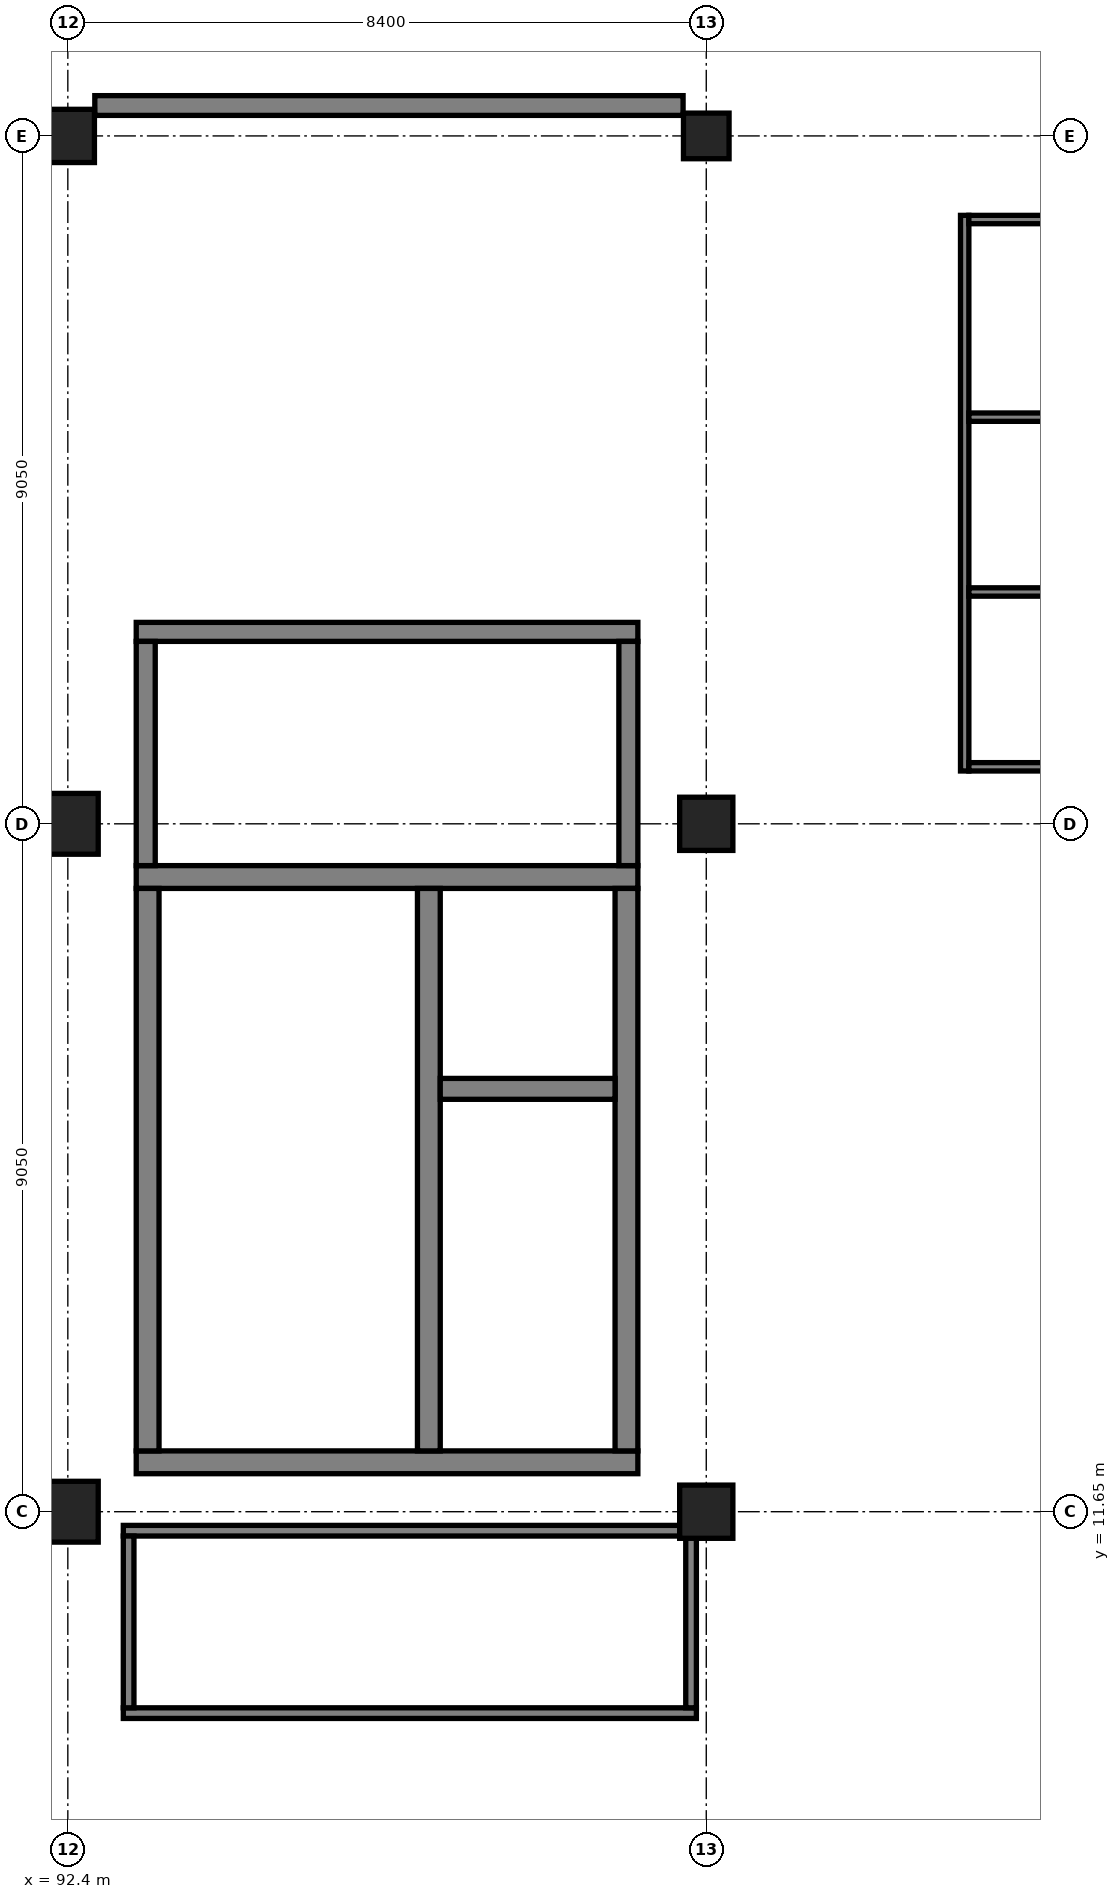
"""IFC4 building model, lengths in metres.
Left out: names, types, materials, properties, quantities, classifications, styles, units other than length and angle.
Written with IfcOpenShell. Run it as: python <this file> out.ifc"""

import sys

from ifc_helpers import new_model, si_unit, direction, frame, frame_2d, origin, origin_2d, place, context, subcontext, project, spatial, rectangle, extrude, element, fill, save


model = new_model("IFC4")
c1 = context("Model", 3, precision=1e-05, world=origin(), true_north=direction((0.0, 1.0)))
c2 = subcontext(c1, "Body", "Model", "MODEL_VIEW")
j1 = project(units=[si_unit("LENGTHUNIT", "METRE"), si_unit("PLANEANGLEUNIT", "RADIAN")], contexts=[c1])
p1 = place(None, origin())
s1 = spatial("IfcSite", under=j1, at=p1, CompositionType="ELEMENT")
p2 = place(p1, origin())
s2 = spatial("IfcBuilding", under=s1, at=p2, CompositionType="ELEMENT")
p3 = place(p2, frame((0.0, 0.0, 10.8)))
s3 = spatial("IfcBuildingStorey", under=s2, at=p3, CompositionType="ELEMENT", Elevation=10.8)
for number, where, z_axis, x_axis in (
    (1, (92.4, 11.65, 0.0), (0.0, 0.0, 1.0), (1.0, 0.0, 0.0)),
    (2, (92.4, 20.7, 0.0), (0.0, 0.0, 1.0), (1.0, 0.0, 0.0)),
):
    element("IfcColumn", number, at=place(p3, frame(where, z_axis=z_axis, x_axis=x_axis)), inside=s3, PredefinedType="COLUMN", context=c2, shape_type="SweptSolid", body=[
        extrude(rectangle(XDim=0.8, YDim=0.8, at=origin_2d()), origin(), (0.0, 0.0, 1.0), 4.8),
    ])
for number, where, z_axis, x_axis in (
    (3, (92.4, 29.75, 0.0), (0.0, 0.0, 1.0), (1.0, 0.0, 0.0)),
    (4, (100.8, 11.65, 0.0), (0.0, 0.0, 1.0), (1.0, 0.0, 0.0)),
    (5, (100.8, 20.7, 0.0), (0.0, 0.0, 1.0), (1.0, 0.0, 0.0)),
):
    element("IfcColumn", number, at=place(p3, frame(where, z_axis=z_axis, x_axis=x_axis)), inside=s3, PredefinedType="COLUMN", context=c2, shape_type="SweptSolid", body=[
        extrude(rectangle(XDim=0.7, YDim=0.7, at=origin_2d()), origin(), (0.0, 0.0, 1.0), 4.8),
    ])
p4 = place(p3, frame((100.8, 29.75, 0.0), z_axis=(0.0, 0.0, 1.0), x_axis=(1.0, 0.0, 0.0)))
e6 = element("IfcColumn", 6, at=p4, inside=s3, PredefinedType="COLUMN", context=c2, shape_type="SweptSolid", body=[
    extrude(rectangle(XDim=0.6, YDim=0.6, at=origin_2d()), origin(), (0.0, 0.0, 1.0), 4.8),
])
p5 = place(p3, frame((100.495, 30.15, 0.0), z_axis=(0.0, 0.0, 1.0), x_axis=(-1.0, 0.0, 0.0)))
e7 = element("IfcWall", 7, at=p5, inside=s3, PredefinedType="STANDARD", context=c2, shape_type="SweptSolid", body=[
    extrude(rectangle(XDim=7.74, YDim=0.26, at=frame_2d((3.87, 0.0))), origin(), (0.0, 0.0, 1.0), 4.5),
])
p6 = place(p5, frame((3.07, 0.0, 0.0)))
e8 = element("IfcOpeningElement", 8, at=p6, cuts=e7, PredefinedType="OPENING", context=c2, shape_type="SweptSolid", body=[
    extrude(rectangle(XDim=1.6, YDim=2.25, at=frame_2d((0.8, 1.125))), frame((0.0, 0.14, 0.0), z_axis=(0.0, -1.0, 0.0), x_axis=(1.0, 0.0, 0.0)), (0.0, 0.0, 1.0), 0.28),
])
p7 = place(p3, frame((93.3, 12.3, 0.0), z_axis=(0.0, 0.0, 1.0), x_axis=(1.0, 0.0, 0.0)))
e9 = element("IfcWall", 9, at=p7, inside=s3, PredefinedType="SHEAR", context=c2, shape_type="SweptSolid", body=[
    extrude(rectangle(XDim=6.6, YDim=0.3, at=frame_2d((3.3, 0.0))), origin(), (0.0, 0.0, 1.0), 4.5),
])
p8 = place(p3, frame((93.3, 20.0, 0.0), z_axis=(0.0, 0.0, 1.0), x_axis=(1.0, 0.0, 0.0)))
e10 = element("IfcWall", 10, at=p8, inside=s3, PredefinedType="SHEAR", context=c2, shape_type="SweptSolid", body=[
    extrude(rectangle(XDim=6.6, YDim=0.3, at=frame_2d((3.3, 0.0))), origin(), (0.0, 0.0, 1.0), 4.5),
])
p9 = place(p8, frame((1.425, 0.0, 0.0)))
e11 = element("IfcOpeningElement", 11, at=p9, cuts=e10, PredefinedType="OPENING", context=c2, shape_type="SweptSolid", body=[
    extrude(rectangle(XDim=1.15, YDim=2.2, at=frame_2d((0.575, 1.1))), frame((0.0, 0.16, 0.0), z_axis=(0.0, -1.0, 0.0), x_axis=(1.0, 0.0, 0.0)), (0.0, 0.0, 1.0), 0.32),
])
p10 = place(p8, frame((4.55, 0.0, 0.0)))
e12 = element("IfcOpeningElement", 12, at=p10, cuts=e10, PredefinedType="OPENING", context=c2, shape_type="SweptSolid", body=[
    extrude(rectangle(XDim=1.2, YDim=2.15, at=frame_2d((0.6, 1.075))), frame((0.0, 0.16, 0.0), z_axis=(0.0, -1.0, 0.0), x_axis=(1.0, 0.0, 0.0)), (0.0, 0.0, 1.0), 0.32),
])
for number, where, z_axis, x_axis in (
    (13, (93.45, 12.45, 0.0), (0.0, 0.0, 1.0), (0.0, 1.0, 0.0)),
    (14, (99.75, 12.45, 0.0), (0.0, 0.0, 1.0), (0.0, 1.0, 0.0)),
    (15, (97.15, 12.45, 0.0), (0.0, 0.0, 1.0), (0.0, 1.0, 0.0)),
):
    element("IfcWall", number, at=place(p3, frame(where, z_axis=z_axis, x_axis=x_axis)), inside=s3, PredefinedType="SHEAR", context=c2, shape_type="SweptSolid", body=[
        extrude(rectangle(XDim=7.4, YDim=0.3, at=frame_2d((3.7, 0.0))), origin(), (0.0, 0.0, 1.0), 4.5),
    ])
p11 = place(p3, frame((97.3, 17.213, 0.0), z_axis=(0.0, 0.0, 1.0), x_axis=(1.0, 0.0, 0.0)))
e16 = element("IfcWall", 16, at=p11, inside=s3, PredefinedType="SHEAR", context=c2, shape_type="SweptSolid", body=[
    extrude(rectangle(XDim=2.3, YDim=0.275, at=frame_2d((1.15, 0.0))), origin(), (0.0, 0.0, 1.0), 4.5),
])
p12 = place(p3, frame((93.3, 23.225, 0.0), z_axis=(0.0, 0.0, 1.0), x_axis=(1.0, 0.0, 0.0)))
e17 = element("IfcWall", 17, at=p12, inside=s3, PredefinedType="PARTITIONING", context=c2, shape_type="SweptSolid", body=[
    extrude(rectangle(XDim=6.6, YDim=0.25, at=frame_2d((3.3, 0.0))), origin(), (0.0, 0.0, 1.0), 4.5),
])
p13 = place(p12, frame((2.4, 0.0, 0.0)))
e18 = element("IfcOpeningElement", 18, at=p13, cuts=e17, PredefinedType="OPENING", context=c2, shape_type="SweptSolid", body=[
    extrude(rectangle(XDim=1.8, YDim=2.25, at=frame_2d((0.9, 1.125))), frame((0.0, 0.135, 0.0), z_axis=(0.0, -1.0, 0.0), x_axis=(1.0, 0.0, 0.0)), (0.0, 0.0, 1.0), 0.27),
])
for number, where, z_axis, x_axis in (
    (19, (93.425, 20.15, 0.0), (0.0, 0.0, 1.0), (0.0, 1.0, 0.0)),
    (20, (99.775, 20.15, 0.0), (0.0, 0.0, 1.0), (0.0, 1.0, 0.0)),
):
    element("IfcWall", number, at=place(p3, frame(where, z_axis=z_axis, x_axis=x_axis)), inside=s3, PredefinedType="PARTITIONING", context=c2, shape_type="SweptSolid", body=[
        extrude(rectangle(XDim=2.95, YDim=0.25, at=frame_2d((1.475, 0.0))), origin(), (0.0, 0.0, 1.0), 3.73),
    ])
p14 = place(p3, frame((104.2, 21.395, 0.0), z_axis=(0.0, 0.0, 1.0), x_axis=(0.0, 1.0, 0.0)))
e21 = element("IfcWall", 21, at=p14, inside=s3, PredefinedType="PARTITIONING", context=c2, shape_type="SweptSolid", body=[
    extrude(rectangle(XDim=7.31, YDim=0.11, at=frame_2d((3.655, 0.0))), origin(), (0.0, 0.0, 1.0), 2.31),
])
p15 = place(p14, frame((0.745, 0.0, 0.0)))
e22 = element("IfcOpeningElement", 22, at=p15, cuts=e21, PredefinedType="OPENING", context=c2, shape_type="SweptSolid", body=[
    extrude(rectangle(XDim=0.92, YDim=2.1, at=frame_2d((0.46, 1.05))), frame((0.0, 0.065, 0.0), z_axis=(0.0, -1.0, 0.0), x_axis=(1.0, 0.0, 0.0)), (0.0, 0.0, 1.0), 0.13),
])
p16 = place(p14, frame((3.045, 0.0, 0.0)))
e23 = element("IfcOpeningElement", 23, at=p16, cuts=e21, PredefinedType="OPENING", context=c2, shape_type="SweptSolid", body=[
    extrude(rectangle(XDim=0.92, YDim=2.1, at=frame_2d((0.46, 1.05))), frame((0.0, 0.065, 0.0), z_axis=(0.0, -1.0, 0.0), x_axis=(1.0, 0.0, 0.0)), (0.0, 0.0, 1.0), 0.13),
])
p17 = place(p14, frame((5.455, 0.0, 0.0)))
e24 = element("IfcOpeningElement", 24, at=p17, cuts=e21, PredefinedType="OPENING", context=c2, shape_type="SweptSolid", body=[
    extrude(rectangle(XDim=1.0, YDim=2.15, at=frame_2d((0.5, 1.075))), frame((0.0, 0.065, 0.0), z_axis=(0.0, -1.0, 0.0), x_axis=(1.0, 0.0, 0.0)), (0.0, 0.0, 1.0), 0.13),
])
for number, where, z_axis, x_axis in (
    (25, (104.255, 21.45, 0.0), (0.0, 0.0, 1.0), (1.0, 0.0, 0.0)),
    (26, (104.255, 23.75, 0.0), (0.0, 0.0, 1.0), (1.0, 0.0, 0.0)),
    (27, (104.255, 26.05, 0.0), (0.0, 0.0, 1.0), (1.0, 0.0, 0.0)),
    (28, (104.255, 28.65, 0.0), (0.0, 0.0, 1.0), (1.0, 0.0, 0.0)),
):
    element("IfcWall", number, at=place(p3, frame(where, z_axis=z_axis, x_axis=x_axis)), inside=s3, PredefinedType="PARTITIONING", context=c2, shape_type="SweptSolid", body=[
        extrude(rectangle(XDim=4.815, YDim=0.11, at=frame_2d((2.408, 0.0))), origin(), (0.0, 0.0, 1.0), 2.31),
    ])
p18 = place(p3, frame((93.13, 9.0, 0.0), z_axis=(0.0, 0.0, 1.0), x_axis=(1.0, 0.0, 0.0)))
e29 = element("IfcWall", 29, at=p18, inside=s3, PredefinedType="PARTITIONING", context=c2, shape_type="SweptSolid", body=[
    extrude(rectangle(XDim=7.54, YDim=0.14, at=frame_2d((3.77, 0.0))), origin(), (0.0, 0.0, 1.0), 3.75),
])
p19 = place(p18, frame((2.75, 0.0, 0.0)))
e30 = element("IfcOpeningElement", 30, at=p19, cuts=e29, PredefinedType="OPENING", context=c2, shape_type="SweptSolid", body=[
    extrude(rectangle(XDim=2.04, YDim=2.4, at=frame_2d((1.02, 1.2))), frame((0.0, 0.08, 0.0), z_axis=(0.0, -1.0, 0.0), x_axis=(1.0, 0.0, 0.0)), (0.0, 0.0, 1.0), 0.16),
])
p20 = place(p3, frame((93.13, 11.4, 0.0), z_axis=(0.0, 0.0, 1.0), x_axis=(1.0, 0.0, 0.0)))
e31 = element("IfcWall", 31, at=p20, inside=s3, PredefinedType="PARTITIONING", context=c2, shape_type="SweptSolid", body=[
    extrude(rectangle(XDim=7.54, YDim=0.14, at=frame_2d((3.77, 0.0))), origin(), (0.0, 0.0, 1.0), 3.73),
])
for number, where, z_axis, x_axis in (
    (32, (100.6, 9.07, 0.0), (0.0, 0.0, 1.0), (0.0, 1.0, 0.0)),
    (33, (93.2, 9.07, 0.0), (0.0, 0.0, 1.0), (0.0, 1.0, 0.0)),
):
    element("IfcWall", number, at=place(p3, frame(where, z_axis=z_axis, x_axis=x_axis)), inside=s3, PredefinedType="PARTITIONING", context=c2, shape_type="SweptSolid", body=[
        extrude(rectangle(XDim=2.26, YDim=0.14, at=frame_2d((1.13, 0.0))), origin(), (0.0, 0.0, 1.0), 3.73),
    ])
p21 = place(p6, frame((1.6, 0.0, 0.0), z_axis=(0.0, 0.0, 1.0), x_axis=(-1.0, 0.0, 0.0)))
e34 = element("IfcDoor", 34, at=p21, inside=s3, OperationType="DOUBLE_DOOR_SINGLE_SWING", PredefinedType="DOOR", context=c2, shape_type="SweptSolid", body=[
    extrude(rectangle(XDim=1.6, YDim=2.25, at=frame_2d((0.8, 1.125))), frame((0.0, 0.025, 0.0), z_axis=(0.0, -1.0, 0.0), x_axis=(1.0, 0.0, 0.0)), (0.0, 0.0, 1.0), 0.05),
])
fill(e8, e34)
p22 = place(p9, frame((1.15, 0.0, 0.0), z_axis=(0.0, 0.0, 1.0), x_axis=(-1.0, 0.0, 0.0)))
e35 = element("IfcDoor", 35, at=p22, inside=s3, OperationType="SINGLE_SWING_RIGHT", PredefinedType="DOOR", context=c2, shape_type="SweptSolid", body=[
    extrude(rectangle(XDim=1.15, YDim=2.2, at=frame_2d((0.575, 1.1))), frame((0.0, 0.025, 0.0), z_axis=(0.0, -1.0, 0.0), x_axis=(1.0, 0.0, 0.0)), (0.0, 0.0, 1.0), 0.05),
])
fill(e11, e35)
p23 = place(p10, origin())
e36 = element("IfcDoor", 36, at=p23, inside=s3, OperationType="DOUBLE_DOOR_SLIDING", PredefinedType="DOOR", context=c2, shape_type="SweptSolid", body=[
    extrude(rectangle(XDim=1.2, YDim=2.15, at=frame_2d((0.6, 1.075))), frame((0.0, 0.025, 0.0), z_axis=(0.0, -1.0, 0.0), x_axis=(1.0, 0.0, 0.0)), (0.0, 0.0, 1.0), 0.05),
])
fill(e12, e36)
p24 = place(p13, origin())
e37 = element("IfcDoor", 37, at=p24, inside=s3, OperationType="DOUBLE_DOOR_SINGLE_SWING", PredefinedType="DOOR", context=c2, shape_type="SweptSolid", body=[
    extrude(rectangle(XDim=1.8, YDim=2.25, at=frame_2d((0.9, 1.125))), frame((0.0, 0.025, 0.0), z_axis=(0.0, -1.0, 0.0), x_axis=(1.0, 0.0, 0.0)), (0.0, 0.0, 1.0), 0.05),
])
fill(e18, e37)
p25 = place(p15, origin())
e38 = element("IfcDoor", 38, at=p25, inside=s3, OperationType="SINGLE_SWING_RIGHT", PredefinedType="DOOR", context=c2, shape_type="SweptSolid", body=[
    extrude(rectangle(XDim=0.92, YDim=2.1, at=frame_2d((0.46, 1.05))), frame((0.0, 0.025, 0.0), z_axis=(0.0, -1.0, 0.0), x_axis=(1.0, 0.0, 0.0)), (0.0, 0.0, 1.0), 0.05),
])
fill(e22, e38)
p26 = place(p16, origin())
e39 = element("IfcDoor", 39, at=p26, inside=s3, OperationType="SINGLE_SWING_LEFT", PredefinedType="DOOR", context=c2, shape_type="SweptSolid", body=[
    extrude(rectangle(XDim=0.92, YDim=2.1, at=frame_2d((0.46, 1.05))), frame((0.0, 0.025, 0.0), z_axis=(0.0, -1.0, 0.0), x_axis=(1.0, 0.0, 0.0)), (0.0, 0.0, 1.0), 0.05),
])
fill(e23, e39)
p27 = place(p17, origin())
e40 = element("IfcDoor", 40, at=p27, inside=s3, OperationType="SINGLE_SWING_RIGHT", PredefinedType="DOOR", context=c2, shape_type="SweptSolid", body=[
    extrude(rectangle(XDim=1.0, YDim=2.15, at=frame_2d((0.5, 1.075))), frame((0.0, 0.025, 0.0), z_axis=(0.0, -1.0, 0.0), x_axis=(1.0, 0.0, 0.0)), (0.0, 0.0, 1.0), 0.05),
])
fill(e24, e40)
p28 = place(p19, origin())
e41 = element("IfcDoor", 41, at=p28, inside=s3, OperationType="DOUBLE_DOOR_SINGLE_SWING", PredefinedType="DOOR", context=c2, shape_type="SweptSolid", body=[
    extrude(rectangle(XDim=2.04, YDim=2.4, at=frame_2d((1.02, 1.2))), frame((0.0, 0.025, 0.0), z_axis=(0.0, -1.0, 0.0), x_axis=(1.0, 0.0, 0.0)), (0.0, 0.0, 1.0), 0.05),
])
fill(e30, e41)
save(model, sys.argv[1])
